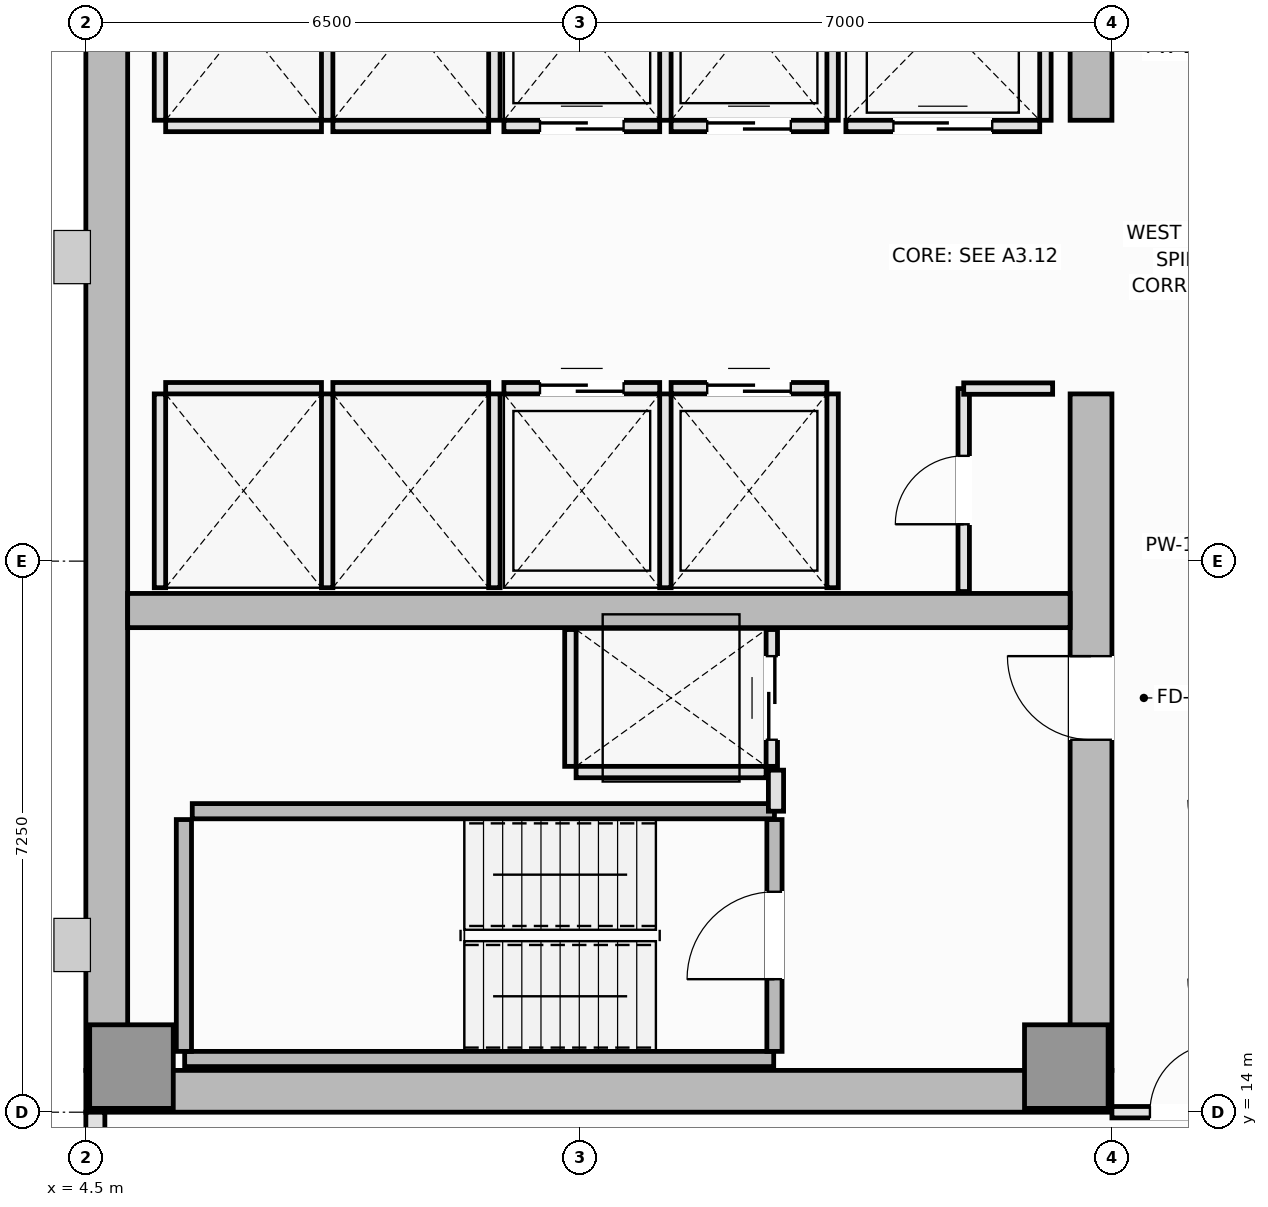
"""IFC4 building model, lengths in metres.
Left out: names, types, materials, properties, quantities, classifications, styles, units other than length and angle.
Written with IfcOpenShell. Run it as: python <this file> out.ifc"""

import sys

from ifc_helpers import new_model, si_unit, direction, frame, frame_2d, origin, origin_2d, place, context, subcontext, project, spatial, rectangle, extrude, element, fill, save


model = new_model("IFC4")
c1 = context("Model", 3, precision=1e-05, world=origin(), true_north=direction((0.0, 1.0)))
c2 = subcontext(c1, "Body", "Model", "MODEL_VIEW")
j1 = project(units=[si_unit("LENGTHUNIT", "METRE"), si_unit("PLANEANGLEUNIT", "RADIAN")], contexts=[c1])
p1 = place(None, origin())
s1 = spatial("IfcSite", under=j1, at=p1, CompositionType="ELEMENT")
p2 = place(p1, origin())
s2 = spatial("IfcBuilding", under=s1, at=p2, CompositionType="ELEMENT")
p3 = place(p2, frame((0.0, 0.0, 188.05)))
s3 = spatial("IfcBuildingStorey", under=s2, at=p3, CompositionType="ELEMENT", Elevation=188.05)
p4 = place(p3, frame((4.5, 14.275, 0.0), z_axis=(0.0, 0.0, 1.0), x_axis=(1.0, 0.0, 0.0)))
e1 = element("IfcWall", 1, at=p4, inside=s3, PredefinedType="SHEAR", context=c2, shape_type="SweptSolid", body=[
    extrude(rectangle(XDim=13.5, YDim=0.55, at=frame_2d((6.75, 0.0))), origin(), (0.0, 0.0, 1.0), 3.55),
])
p5 = place(p3, frame((4.775, 14.55, 0.0), z_axis=(0.0, 0.0, 1.0), x_axis=(0.0, 1.0, 0.0)))
e2 = element("IfcWall", 2, at=p5, inside=s3, PredefinedType="SHEAR", context=c2, shape_type="SweptSolid", body=[
    extrude(rectangle(XDim=21.4, YDim=0.55, at=frame_2d((10.7, 0.0))), origin(), (0.0, 0.0, 1.0), 3.55),
])
p6 = place(p3, frame((17.725, 14.55, 0.0), z_axis=(0.0, 0.0, 1.0), x_axis=(0.0, 1.0, 0.0)))
e3 = element("IfcWall", 3, at=p6, inside=s3, PredefinedType="SHEAR", context=c2, shape_type="SweptSolid", body=[
    extrude(rectangle(XDim=8.9, YDim=0.55, at=frame_2d((4.45, 0.0))), origin(), (0.0, 0.0, 1.0), 3.55),
])
p7 = place(p6, frame((4.35, 0.0, 0.0)))
e4 = element("IfcOpeningElement", 4, at=p7, cuts=e3, PredefinedType="OPENING", context=c2, shape_type="SweptSolid", body=[
    extrude(rectangle(XDim=1.1, YDim=2.15, at=frame_2d((0.55, 1.075))), frame((0.0, 0.285, 0.0), z_axis=(0.0, -1.0, 0.0), x_axis=(1.0, 0.0, 0.0)), (0.0, 0.0, 1.0), 0.57),
])
p8 = place(p3, frame((17.725, 27.05, 0.0), z_axis=(0.0, 0.0, 1.0), x_axis=(0.0, 1.0, 0.0)))
e5 = element("IfcWall", 5, at=p8, inside=s3, PredefinedType="SHEAR", context=c2, shape_type="SweptSolid", body=[
    extrude(rectangle(XDim=8.9, YDim=0.55, at=frame_2d((4.45, 0.0))), origin(), (0.0, 0.0, 1.0), 3.55),
])
p9 = place(p8, frame((3.45, 0.0, 0.0)))
e6 = element("IfcOpeningElement", 6, at=p9, cuts=e5, PredefinedType="OPENING", context=c2, shape_type="SweptSolid", body=[
    extrude(rectangle(XDim=1.1, YDim=2.15, at=frame_2d((0.55, 1.075))), frame((0.0, 0.285, 0.0), z_axis=(0.0, -1.0, 0.0), x_axis=(1.0, 0.0, 0.0)), (0.0, 0.0, 1.0), 0.57),
])
p10 = place(p3, frame((5.05, 20.6, 0.0), z_axis=(0.0, 0.0, 1.0), x_axis=(1.0, 0.0, 0.0)))
e7 = element("IfcWall", 7, at=p10, inside=s3, PredefinedType="SHEAR", context=c2, shape_type="SweptSolid", body=[
    extrude(rectangle(XDim=12.4, YDim=0.45, at=frame_2d((6.2, 0.0))), origin(), (0.0, 0.0, 1.0), 3.55),
])
for number, where, z_axis, x_axis in (
    (8, (5.1, 14.6, 0.0), (0.0, 0.0, 1.0), (1.0, 0.0, 0.0)),
    (9, (17.4, 14.6, 0.0), (0.0, 0.0, 1.0), (1.0, 0.0, 0.0)),
):
    element("IfcColumn", number, at=place(p3, frame(where, z_axis=z_axis, x_axis=x_axis)), inside=s3, PredefinedType="PILASTER", context=c2, shape_type="SweptSolid", body=[
        extrude(rectangle(XDim=1.1, YDim=1.1, at=origin_2d()), origin(), (0.0, 0.0, 1.0), 3.55),
    ])
p11 = place(p3, frame((4.625, 14.0, 0.0), z_axis=(0.0, 0.0, 1.0), x_axis=(0.0, -1.0, 0.0)))
e10 = element("IfcWall", 10, at=p11, inside=s3, PredefinedType="SOLIDWALL", context=c2, shape_type="SweptSolid", body=[
    extrude(rectangle(XDim=4.0, YDim=0.25, at=frame_2d((2.0, 0.0))), origin(), (0.0, 0.0, 1.0), 3.37),
])
p12 = place(p11, frame((0.9, 0.0, 0.9)))
e11 = element("IfcOpeningElement", 11, at=p12, cuts=e10, PredefinedType="OPENING", context=c2, shape_type="SweptSolid", body=[
    extrude(rectangle(XDim=2.2, YDim=1.8, at=frame_2d((1.1, 0.9))), frame((0.0, 0.135, 0.0), z_axis=(0.0, -1.0, 0.0), x_axis=(1.0, 0.0, 0.0)), (0.0, 0.0, 1.0), 0.27),
])
p13 = place(p3, frame((5.8, 14.7, 0.0), z_axis=(0.0, 0.0, 1.0), x_axis=(1.0, 0.0, 0.0)))
e12 = element("IfcWall", 12, at=p13, inside=s3, PredefinedType="SOLIDWALL", context=c2, shape_type="SweptSolid", body=[
    extrude(rectangle(XDim=7.75, YDim=0.2, at=frame_2d((3.875, 0.0))), origin(), (0.0, 0.0, 1.0), 3.55),
])
p14 = place(p3, frame((5.79, 14.8, 0.0), z_axis=(0.0, 0.0, 1.0), x_axis=(0.0, 1.0, 0.0)))
e13 = element("IfcWall", 13, at=p14, inside=s3, PredefinedType="SOLIDWALL", context=c2, shape_type="SweptSolid", body=[
    extrude(rectangle(XDim=3.05, YDim=0.2, at=frame_2d((1.525, 0.0))), origin(), (0.0, 0.0, 1.0), 3.55),
])
p15 = place(p3, frame((5.9, 17.96, 0.0), z_axis=(0.0, 0.0, 1.0), x_axis=(1.0, 0.0, 0.0)))
e14 = element("IfcWall", 14, at=p15, inside=s3, PredefinedType="SOLIDWALL", context=c2, shape_type="SweptSolid", body=[
    extrude(rectangle(XDim=7.66, YDim=0.2, at=frame_2d((3.83, 0.0))), origin(), (0.0, 0.0, 1.0), 3.55),
])
p16 = place(p3, frame((13.56, 14.8, 0.0), z_axis=(0.0, 0.0, 1.0), x_axis=(0.0, 1.0, 0.0)))
e15 = element("IfcWall", 15, at=p16, inside=s3, PredefinedType="SOLIDWALL", context=c2, shape_type="SweptSolid", body=[
    extrude(rectangle(XDim=3.05, YDim=0.2, at=frame_2d((1.525, 0.0))), origin(), (0.0, 0.0, 1.0), 3.55),
])
p17 = place(p16, frame((0.95, 0.0, 0.0)))
e16 = element("IfcOpeningElement", 16, at=p17, cuts=e15, PredefinedType="OPENING", context=c2, shape_type="SweptSolid", body=[
    extrude(rectangle(XDim=1.15, YDim=2.15, at=frame_2d((0.575, 1.075))), frame((0.0, 0.11, 0.0), z_axis=(0.0, -1.0, 0.0), x_axis=(1.0, 0.0, 0.0)), (0.0, 0.0, 1.0), 0.22),
])
p18 = place(p3, frame((5.55, 23.525, 0.0), z_axis=(0.0, 0.0, 1.0), x_axis=(1.0, 0.0, 0.0)))
e17 = element("IfcWall", 17, at=p18, inside=s3, PredefinedType="PARTITIONING", context=c2, shape_type="SweptSolid", body=[
    extrude(rectangle(XDim=2.05, YDim=0.15, at=frame_2d((1.025, 0.0))), origin(), (0.0, 0.0, 1.0), 3.37),
])
for number, where, z_axis, x_axis in (
    (18, (5.475, 20.9, 0.0), (0.0, 0.0, 1.0), (0.0, 1.0, 0.0)),
    (19, (7.675, 20.9, 0.0), (0.0, 0.0, 1.0), (0.0, 1.0, 0.0)),
):
    element("IfcWall", number, at=place(p3, frame(where, z_axis=z_axis, x_axis=x_axis)), inside=s3, PredefinedType="PARTITIONING", context=c2, shape_type="SweptSolid", body=[
        extrude(rectangle(XDim=2.55, YDim=0.15, at=frame_2d((1.275, 0.0))), origin(), (0.0, 0.0, 1.0), 3.37),
    ])
p19 = place(p3, frame((7.75, 23.525, 0.0), z_axis=(0.0, 0.0, 1.0), x_axis=(1.0, 0.0, 0.0)))
e20 = element("IfcWall", 20, at=p19, inside=s3, PredefinedType="PARTITIONING", context=c2, shape_type="SweptSolid", body=[
    extrude(rectangle(XDim=2.05, YDim=0.15, at=frame_2d((1.025, 0.0))), origin(), (0.0, 0.0, 1.0), 3.37),
])
p20 = place(p3, frame((9.875, 20.9, 0.0), z_axis=(0.0, 0.0, 1.0), x_axis=(0.0, 1.0, 0.0)))
e21 = element("IfcWall", 21, at=p20, inside=s3, PredefinedType="PARTITIONING", context=c2, shape_type="SweptSolid", body=[
    extrude(rectangle(XDim=2.55, YDim=0.15, at=frame_2d((1.275, 0.0))), origin(), (0.0, 0.0, 1.0), 3.37),
])
p21 = place(p3, frame((5.55, 26.975, 0.0), z_axis=(0.0, 0.0, 1.0), x_axis=(1.0, 0.0, 0.0)))
e22 = element("IfcWall", 22, at=p21, inside=s3, PredefinedType="PARTITIONING", context=c2, shape_type="SweptSolid", body=[
    extrude(rectangle(XDim=2.05, YDim=0.15, at=frame_2d((1.025, 0.0))), origin(), (0.0, 0.0, 1.0), 3.37),
])
for number, where, z_axis, x_axis in (
    (23, (5.475, 27.05, 0.0), (0.0, 0.0, 1.0), (0.0, 1.0, 0.0)),
    (24, (7.675, 27.05, 0.0), (0.0, 0.0, 1.0), (0.0, 1.0, 0.0)),
):
    element("IfcWall", number, at=place(p3, frame(where, z_axis=z_axis, x_axis=x_axis)), inside=s3, PredefinedType="PARTITIONING", context=c2, shape_type="SweptSolid", body=[
        extrude(rectangle(XDim=2.55, YDim=0.15, at=frame_2d((1.275, 0.0))), origin(), (0.0, 0.0, 1.0), 3.37),
    ])
p22 = place(p3, frame((7.75, 26.975, 0.0), z_axis=(0.0, 0.0, 1.0), x_axis=(1.0, 0.0, 0.0)))
e25 = element("IfcWall", 25, at=p22, inside=s3, PredefinedType="PARTITIONING", context=c2, shape_type="SweptSolid", body=[
    extrude(rectangle(XDim=2.05, YDim=0.15, at=frame_2d((1.025, 0.0))), origin(), (0.0, 0.0, 1.0), 3.37),
])
p23 = place(p3, frame((9.875, 27.05, 0.0), z_axis=(0.0, 0.0, 1.0), x_axis=(0.0, 1.0, 0.0)))
e26 = element("IfcWall", 26, at=p23, inside=s3, PredefinedType="PARTITIONING", context=c2, shape_type="SweptSolid", body=[
    extrude(rectangle(XDim=2.55, YDim=0.15, at=frame_2d((1.275, 0.0))), origin(), (0.0, 0.0, 1.0), 3.37),
])
p24 = place(p3, frame((10.0, 23.525, 0.0), z_axis=(0.0, 0.0, 1.0), x_axis=(1.0, 0.0, 0.0)))
e27 = element("IfcWall", 27, at=p24, inside=s3, PredefinedType="PARTITIONING", context=c2, shape_type="SweptSolid", body=[
    extrude(rectangle(XDim=2.05, YDim=0.15, at=frame_2d((1.025, 0.0))), origin(), (0.0, 0.0, 1.0), 3.37),
])
p25 = place(p24, frame((0.475, 0.0, 0.0)))
e28 = element("IfcOpeningElement", 28, at=p25, cuts=e27, PredefinedType="OPENING", context=c2, shape_type="SweptSolid", body=[
    extrude(rectangle(XDim=1.1, YDim=2.2, at=frame_2d((0.55, 1.1))), frame((0.0, 0.085, 0.0), z_axis=(0.0, -1.0, 0.0), x_axis=(1.0, 0.0, 0.0)), (0.0, 0.0, 1.0), 0.17),
])
p26 = place(p3, frame((12.125, 20.9, 0.0), z_axis=(0.0, 0.0, 1.0), x_axis=(0.0, 1.0, 0.0)))
e29 = element("IfcWall", 29, at=p26, inside=s3, PredefinedType="PARTITIONING", context=c2, shape_type="SweptSolid", body=[
    extrude(rectangle(XDim=2.55, YDim=0.15, at=frame_2d((1.275, 0.0))), origin(), (0.0, 0.0, 1.0), 3.37),
])
p27 = place(p3, frame((12.2, 23.525, 0.0), z_axis=(0.0, 0.0, 1.0), x_axis=(1.0, 0.0, 0.0)))
e30 = element("IfcWall", 30, at=p27, inside=s3, PredefinedType="PARTITIONING", context=c2, shape_type="SweptSolid", body=[
    extrude(rectangle(XDim=2.05, YDim=0.15, at=frame_2d((1.025, 0.0))), origin(), (0.0, 0.0, 1.0), 3.37),
])
p28 = place(p27, frame((0.475, 0.0, 0.0)))
e31 = element("IfcOpeningElement", 31, at=p28, cuts=e30, PredefinedType="OPENING", context=c2, shape_type="SweptSolid", body=[
    extrude(rectangle(XDim=1.1, YDim=2.2, at=frame_2d((0.55, 1.1))), frame((0.0, 0.085, 0.0), z_axis=(0.0, -1.0, 0.0), x_axis=(1.0, 0.0, 0.0)), (0.0, 0.0, 1.0), 0.17),
])
p29 = place(p3, frame((14.325, 20.9, 0.0), z_axis=(0.0, 0.0, 1.0), x_axis=(0.0, 1.0, 0.0)))
e32 = element("IfcWall", 32, at=p29, inside=s3, PredefinedType="PARTITIONING", context=c2, shape_type="SweptSolid", body=[
    extrude(rectangle(XDim=2.55, YDim=0.15, at=frame_2d((1.275, 0.0))), origin(), (0.0, 0.0, 1.0), 3.37),
])
p30 = place(p3, frame((10.0, 26.975, 0.0), z_axis=(0.0, 0.0, 1.0), x_axis=(1.0, 0.0, 0.0)))
e33 = element("IfcWall", 33, at=p30, inside=s3, PredefinedType="PARTITIONING", context=c2, shape_type="SweptSolid", body=[
    extrude(rectangle(XDim=2.05, YDim=0.15, at=frame_2d((1.025, 0.0))), origin(), (0.0, 0.0, 1.0), 3.37),
])
p31 = place(p30, frame((0.475, 0.0, 0.0)))
e34 = element("IfcOpeningElement", 34, at=p31, cuts=e33, PredefinedType="OPENING", context=c2, shape_type="SweptSolid", body=[
    extrude(rectangle(XDim=1.1, YDim=2.2, at=frame_2d((0.55, 1.1))), frame((0.0, 0.085, 0.0), z_axis=(0.0, -1.0, 0.0), x_axis=(1.0, 0.0, 0.0)), (0.0, 0.0, 1.0), 0.17),
])
p32 = place(p3, frame((12.125, 27.05, 0.0), z_axis=(0.0, 0.0, 1.0), x_axis=(0.0, 1.0, 0.0)))
e35 = element("IfcWall", 35, at=p32, inside=s3, PredefinedType="PARTITIONING", context=c2, shape_type="SweptSolid", body=[
    extrude(rectangle(XDim=2.55, YDim=0.15, at=frame_2d((1.275, 0.0))), origin(), (0.0, 0.0, 1.0), 3.37),
])
p33 = place(p3, frame((12.2, 26.975, 0.0), z_axis=(0.0, 0.0, 1.0), x_axis=(1.0, 0.0, 0.0)))
e36 = element("IfcWall", 36, at=p33, inside=s3, PredefinedType="PARTITIONING", context=c2, shape_type="SweptSolid", body=[
    extrude(rectangle(XDim=2.05, YDim=0.15, at=frame_2d((1.025, 0.0))), origin(), (0.0, 0.0, 1.0), 3.37),
])
p34 = place(p33, frame((0.475, 0.0, 0.0)))
e37 = element("IfcOpeningElement", 37, at=p34, cuts=e36, PredefinedType="OPENING", context=c2, shape_type="SweptSolid", body=[
    extrude(rectangle(XDim=1.1, YDim=2.2, at=frame_2d((0.55, 1.1))), frame((0.0, 0.085, 0.0), z_axis=(0.0, -1.0, 0.0), x_axis=(1.0, 0.0, 0.0)), (0.0, 0.0, 1.0), 0.17),
])
p35 = place(p3, frame((14.325, 27.05, 0.0), z_axis=(0.0, 0.0, 1.0), x_axis=(0.0, 1.0, 0.0)))
e38 = element("IfcWall", 38, at=p35, inside=s3, PredefinedType="PARTITIONING", context=c2, shape_type="SweptSolid", body=[
    extrude(rectangle(XDim=2.55, YDim=0.15, at=frame_2d((1.275, 0.0))), origin(), (0.0, 0.0, 1.0), 3.37),
])
p36 = place(p3, frame((14.5, 26.975, 0.0), z_axis=(0.0, 0.0, 1.0), x_axis=(1.0, 0.0, 0.0)))
e39 = element("IfcWall", 39, at=p36, inside=s3, PredefinedType="PARTITIONING", context=c2, shape_type="SweptSolid", body=[
    extrude(rectangle(XDim=2.55, YDim=0.15, at=frame_2d((1.275, 0.0))), origin(), (0.0, 0.0, 1.0), 3.37),
])
p37 = place(p36, frame((0.625, 0.0, 0.0)))
e40 = element("IfcOpeningElement", 40, at=p37, cuts=e39, PredefinedType="OPENING", context=c2, shape_type="SweptSolid", body=[
    extrude(rectangle(XDim=1.3, YDim=2.2, at=frame_2d((0.65, 1.1))), frame((0.0, 0.085, 0.0), z_axis=(0.0, -1.0, 0.0), x_axis=(1.0, 0.0, 0.0)), (0.0, 0.0, 1.0), 0.17),
])
p38 = place(p3, frame((17.125, 27.05, 0.0), z_axis=(0.0, 0.0, 1.0), x_axis=(0.0, 1.0, 0.0)))
e41 = element("IfcWall", 41, at=p38, inside=s3, PredefinedType="PARTITIONING", context=c2, shape_type="SweptSolid", body=[
    extrude(rectangle(XDim=2.6, YDim=0.15, at=frame_2d((1.3, 0.0))), origin(), (0.0, 0.0, 1.0), 3.37),
])
p39 = place(p3, frame((10.95, 18.475, 0.0), z_axis=(0.0, 0.0, 1.0), x_axis=(1.0, 0.0, 0.0)))
e42 = element("IfcWall", 42, at=p39, inside=s3, PredefinedType="PARTITIONING", context=c2, shape_type="SweptSolid", body=[
    extrude(rectangle(XDim=2.5, YDim=0.15, at=frame_2d((1.25, 0.0))), origin(), (0.0, 0.0, 1.0), 3.37),
])
p40 = place(p3, frame((10.875, 18.55, 0.0), z_axis=(0.0, 0.0, 1.0), x_axis=(0.0, 1.0, 0.0)))
e43 = element("IfcWall", 43, at=p40, inside=s3, PredefinedType="PARTITIONING", context=c2, shape_type="SweptSolid", body=[
    extrude(rectangle(XDim=1.8, YDim=0.15, at=frame_2d((0.9, 0.0))), origin(), (0.0, 0.0, 1.0), 3.37),
])
p41 = place(p3, frame((13.525, 18.55, 0.0), z_axis=(0.0, 0.0, 1.0), x_axis=(0.0, 1.0, 0.0)))
e44 = element("IfcWall", 44, at=p41, inside=s3, PredefinedType="PARTITIONING", context=c2, shape_type="SweptSolid", body=[
    extrude(rectangle(XDim=1.8, YDim=0.15, at=frame_2d((0.9, 0.0))), origin(), (0.0, 0.0, 1.0), 3.37),
])
p42 = place(p41, frame((0.35, 0.0, 0.0)))
e45 = element("IfcOpeningElement", 45, at=p42, cuts=e44, PredefinedType="OPENING", context=c2, shape_type="SweptSolid", body=[
    extrude(rectangle(XDim=1.1, YDim=2.2, at=frame_2d((0.55, 1.1))), frame((0.0, 0.085, 0.0), z_axis=(0.0, -1.0, 0.0), x_axis=(1.0, 0.0, 0.0)), (0.0, 0.0, 1.0), 0.17),
])
p43 = place(p3, frame((13.58, 17.96, 0.0), z_axis=(0.0, 0.0, 1.0), x_axis=(0.0, 1.0, 0.0)))
e46 = element("IfcWall", 46, at=p43, inside=s3, PredefinedType="PARTITIONING", context=c2, shape_type="SweptSolid", body=[
    extrude(rectangle(XDim=0.54, YDim=0.2, at=frame_2d((0.27, 0.0))), origin(), (0.0, 0.0, 1.0), 3.37),
])
p44 = place(p3, frame((16.05, 20.85, 0.0), z_axis=(0.0, 0.0, 1.0), x_axis=(0.0, 1.0, 0.0)))
e47 = element("IfcWall", 47, at=p44, inside=s3, PredefinedType="PARTITIONING", context=c2, shape_type="SweptSolid", body=[
    extrude(rectangle(XDim=2.67, YDim=0.15, at=frame_2d((1.335, 0.0))), origin(), (0.0, 0.0, 1.0), 3.37),
])
p45 = place(p44, frame((0.885, 0.0, 0.0)))
e48 = element("IfcOpeningElement", 48, at=p45, cuts=e47, PredefinedType="OPENING", context=c2, shape_type="SweptSolid", body=[
    extrude(rectangle(XDim=0.9, YDim=2.1, at=frame_2d((0.45, 1.05))), frame((0.0, 0.085, 0.0), z_axis=(0.0, -1.0, 0.0), x_axis=(1.0, 0.0, 0.0)), (0.0, 0.0, 1.0), 0.17),
])
p46 = place(p3, frame((16.05, 23.52, 0.0), z_axis=(0.0, 0.0, 1.0), x_axis=(1.0, 0.0, 0.0)))
e49 = element("IfcWall", 49, at=p46, inside=s3, PredefinedType="PARTITIONING", context=c2, shape_type="SweptSolid", body=[
    extrude(rectangle(XDim=1.17, YDim=0.15, at=frame_2d((0.585, 0.0))), origin(), (0.0, 0.0, 1.0), 3.37),
])
p47 = place(p3, frame((18.0, 14.0, 0.0), z_axis=(0.0, 0.0, 1.0), x_axis=(1.0, 0.0, 0.0)))
e50 = element("IfcWall", 50, at=p47, inside=s3, PredefinedType="PARTITIONING", context=c2, shape_type="SweptSolid", body=[
    extrude(rectangle(XDim=1.9, YDim=0.15, at=frame_2d((0.95, 0.0))), origin(), (0.0, 0.0, 1.0), 3.37),
])
p48 = place(p47, frame((0.5, 0.0, 0.0)))
e51 = element("IfcOpeningElement", 51, at=p48, cuts=e50, PredefinedType="OPENING", context=c2, shape_type="SweptSolid", body=[
    extrude(rectangle(XDim=0.9, YDim=2.1, at=frame_2d((0.45, 1.05))), frame((0.0, 0.085, 0.0), z_axis=(0.0, -1.0, 0.0), x_axis=(1.0, 0.0, 0.0)), (0.0, 0.0, 1.0), 0.17),
])
p49 = place(p17, origin())
e52 = element("IfcDoor", 52, at=p49, inside=s3, OperationType="SINGLE_SWING_LEFT", PredefinedType="DOOR", context=c2, shape_type="SweptSolid", body=[
    extrude(rectangle(XDim=1.15, YDim=2.15, at=frame_2d((0.575, 1.075))), frame((0.0, 0.025, 0.0), z_axis=(0.0, -1.0, 0.0), x_axis=(1.0, 0.0, 0.0)), (0.0, 0.0, 1.0), 0.05),
])
fill(e16, e52)
p50 = place(p25, origin())
e53 = element("IfcDoor", 53, at=p50, inside=s3, OperationType="DOUBLE_DOOR_SLIDING", PredefinedType="DOOR", context=c2, shape_type="SweptSolid", body=[
    extrude(rectangle(XDim=1.1, YDim=2.2, at=frame_2d((0.55, 1.1))), frame((0.0, 0.025, 0.0), z_axis=(0.0, -1.0, 0.0), x_axis=(1.0, 0.0, 0.0)), (0.0, 0.0, 1.0), 0.05),
])
fill(e28, e53)
p51 = place(p28, origin())
e54 = element("IfcDoor", 54, at=p51, inside=s3, OperationType="DOUBLE_DOOR_SLIDING", PredefinedType="DOOR", context=c2, shape_type="SweptSolid", body=[
    extrude(rectangle(XDim=1.1, YDim=2.2, at=frame_2d((0.55, 1.1))), frame((0.0, 0.025, 0.0), z_axis=(0.0, -1.0, 0.0), x_axis=(1.0, 0.0, 0.0)), (0.0, 0.0, 1.0), 0.05),
])
fill(e31, e54)
p52 = place(p31, origin())
e55 = element("IfcDoor", 55, at=p52, inside=s3, OperationType="DOUBLE_DOOR_SLIDING", PredefinedType="DOOR", context=c2, shape_type="SweptSolid", body=[
    extrude(rectangle(XDim=1.1, YDim=2.2, at=frame_2d((0.55, 1.1))), frame((0.0, 0.025, 0.0), z_axis=(0.0, -1.0, 0.0), x_axis=(1.0, 0.0, 0.0)), (0.0, 0.0, 1.0), 0.05),
])
fill(e34, e55)
p53 = place(p34, origin())
e56 = element("IfcDoor", 56, at=p53, inside=s3, OperationType="DOUBLE_DOOR_SLIDING", PredefinedType="DOOR", context=c2, shape_type="SweptSolid", body=[
    extrude(rectangle(XDim=1.1, YDim=2.2, at=frame_2d((0.55, 1.1))), frame((0.0, 0.025, 0.0), z_axis=(0.0, -1.0, 0.0), x_axis=(1.0, 0.0, 0.0)), (0.0, 0.0, 1.0), 0.05),
])
fill(e37, e56)
p54 = place(p37, origin())
e57 = element("IfcDoor", 57, at=p54, inside=s3, OperationType="DOUBLE_DOOR_SLIDING", PredefinedType="DOOR", context=c2, shape_type="SweptSolid", body=[
    extrude(rectangle(XDim=1.3, YDim=2.2, at=frame_2d((0.65, 1.1))), frame((0.0, 0.025, 0.0), z_axis=(0.0, -1.0, 0.0), x_axis=(1.0, 0.0, 0.0)), (0.0, 0.0, 1.0), 0.05),
])
fill(e40, e57)
p55 = place(p42, origin())
e58 = element("IfcDoor", 58, at=p55, inside=s3, OperationType="DOUBLE_DOOR_SLIDING", PredefinedType="DOOR", context=c2, shape_type="SweptSolid", body=[
    extrude(rectangle(XDim=1.1, YDim=2.2, at=frame_2d((0.55, 1.1))), frame((0.0, 0.025, 0.0), z_axis=(0.0, -1.0, 0.0), x_axis=(1.0, 0.0, 0.0)), (0.0, 0.0, 1.0), 0.05),
])
fill(e45, e58)
p56 = place(p7, origin())
e59 = element("IfcDoor", 59, at=p56, inside=s3, OperationType="SINGLE_SWING_RIGHT", PredefinedType="DOOR", context=c2, shape_type="SweptSolid", body=[
    extrude(rectangle(XDim=1.1, YDim=2.15, at=frame_2d((0.55, 1.075))), frame((0.0, 0.025, 0.0), z_axis=(0.0, -1.0, 0.0), x_axis=(1.0, 0.0, 0.0)), (0.0, 0.0, 1.0), 0.05),
])
fill(e4, e59)
p57 = place(p45, origin())
e60 = element("IfcDoor", 60, at=p57, inside=s3, OperationType="SINGLE_SWING_LEFT", PredefinedType="DOOR", context=c2, shape_type="SweptSolid", body=[
    extrude(rectangle(XDim=0.9, YDim=2.1, at=frame_2d((0.45, 1.05))), frame((0.0, 0.025, 0.0), z_axis=(0.0, -1.0, 0.0), x_axis=(1.0, 0.0, 0.0)), (0.0, 0.0, 1.0), 0.05),
])
fill(e48, e60)
p58 = place(p48, origin())
e61 = element("IfcDoor", 61, at=p58, inside=s3, OperationType="SINGLE_SWING_RIGHT", PredefinedType="DOOR", context=c2, shape_type="SweptSolid", body=[
    extrude(rectangle(XDim=0.9, YDim=2.1, at=frame_2d((0.45, 1.05))), frame((0.0, 0.025, 0.0), z_axis=(0.0, -1.0, 0.0), x_axis=(1.0, 0.0, 0.0)), (0.0, 0.0, 1.0), 0.05),
])
fill(e51, e61)
save(model, sys.argv[1])
